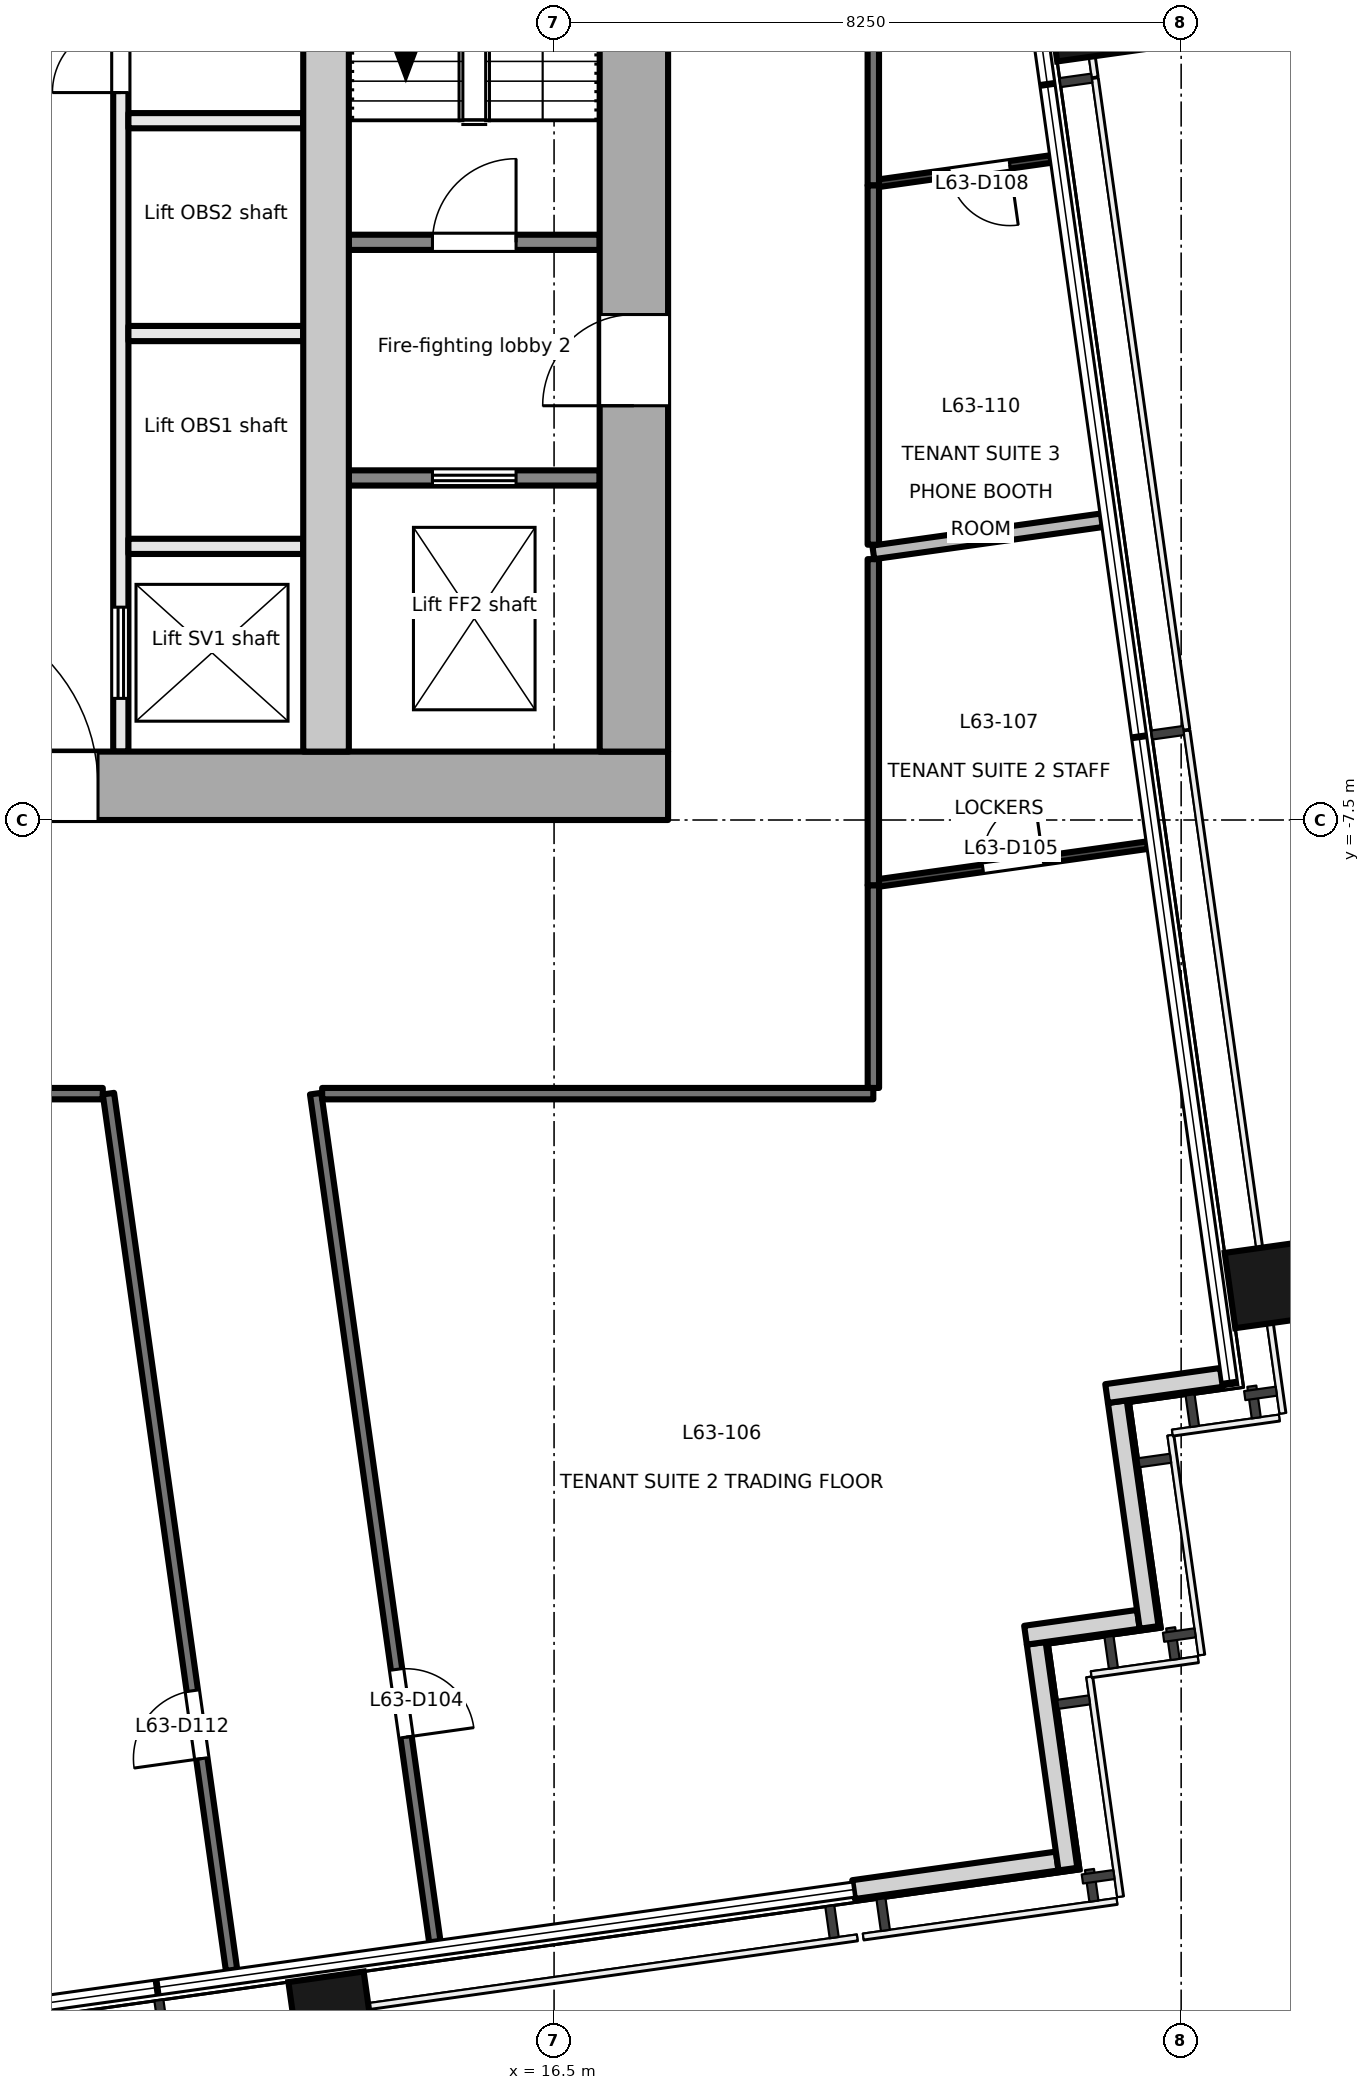
"""IFC4 building model, lengths in metres.
Left out: names, types, materials, properties, quantities, classifications, styles, units other than length and angle.
Written with IfcOpenShell. Run it as: python <this file> out.ifc"""

import sys

from ifc_helpers import new_model, si_unit, direction, frame, frame_2d, origin, origin_2d, place, context, subcontext, project, spatial, rectangle, extrude, element, fill, save


model = new_model("IFC4")
c1 = context("Model", 3, precision=1e-05, world=origin(), true_north=direction((0.0, 1.0)))
c2 = subcontext(c1, "Body", "Model", "MODEL_VIEW")
j1 = project(units=[si_unit("LENGTHUNIT", "METRE"), si_unit("PLANEANGLEUNIT", "RADIAN")], contexts=[c1])
p1 = place(None, origin())
s1 = spatial("IfcSite", under=j1, at=p1, CompositionType="ELEMENT")
p2 = place(p1, origin())
s2 = spatial("IfcBuilding", under=s1, at=p2, CompositionType="ELEMENT")
p3 = place(p2, frame((0.0, 0.0, 274.6)))
s3 = spatial("IfcBuildingStorey", under=s2, at=p3, CompositionType="ELEMENT", Elevation=274.6)
for number, where, z_axis, x_axis in (
    (1, (13.625, -23.61, -0.2), (0.0, 0.0, 1.0), (0.99, 0.139, 0.0)),
    (2, (26.284, -13.565, -0.2), (0.0, 0.0, 1.0), (-0.139, 0.99, 0.0)),
    (3, (23.941, 3.1, -0.2), (0.0, 0.0, 1.0), (-0.139, 0.99, 0.0)),
):
    element("IfcColumn", number, at=place(p3, frame(where, z_axis=z_axis, x_axis=x_axis)), inside=s3, PredefinedType="COLUMN", context=c2, shape_type="SweptSolid", body=[
        extrude(rectangle(XDim=1.0, YDim=1.8, at=origin_2d()), origin(), (0.0, 0.0, 1.0), 3.9),
    ])
p4 = place(p3, frame((20.44, -21.572, 0.0), z_axis=(0.0, 0.0, 1.0), x_axis=(0.990293105353, 0.138994839796, 0.0)))
e4 = element("IfcWall", 4, at=p4, inside=s3, PredefinedType="SOLIDWALL", context=c2, shape_type="SweptSolid", body=[
    extrude(rectangle(XDim=2.705, YDim=0.25, at=frame_2d((1.353, 0.0))), origin(), (0.0, 0.0, 1.0), 3.7),
])
p5 = place(p3, frame((23.26, -21.302, 0.0), z_axis=(0.0, 0.0, 1.0), x_axis=(-0.138994228812, 0.990293191109, 0.0)))
e5 = element("IfcWall", 5, at=p5, inside=s3, PredefinedType="SOLIDWALL", context=c2, shape_type="SweptSolid", body=[
    extrude(rectangle(XDim=3.0, YDim=0.25, at=frame_2d((1.5, 0.0))), origin(), (0.0, 0.0, 1.0), 3.7),
])
p6 = place(p3, frame((22.702, -18.225, 0.0), z_axis=(0.0, 0.0, 1.0), x_axis=(0.990243596651, 0.13934711799, 0.0)))
e6 = element("IfcWall", 6, at=p6, inside=s3, PredefinedType="SOLIDWALL", context=c2, shape_type="SweptSolid", body=[
    extrude(rectangle(XDim=1.5, YDim=0.25, at=frame_2d((0.75, 0.0))), origin(), (0.0, 0.0, 1.0), 3.7),
])
p7 = place(p3, frame((24.328, -18.122, 0.0), z_axis=(0.0, 0.0, 1.0), x_axis=(-0.139358350296, 0.990242015975, 0.0)))
e7 = element("IfcWall", 7, at=p7, inside=s3, PredefinedType="SOLIDWALL", context=c2, shape_type="SweptSolid", body=[
    extrude(rectangle(XDim=2.999, YDim=0.25, at=frame_2d((1.5, 0.0))), origin(), (0.0, 0.0, 1.0), 3.7),
])
p8 = place(p3, frame((23.769, -15.046, 0.0), z_axis=(0.0, 0.0, 1.0), x_axis=(0.990260716096, 0.139225407725, 0.0)))
e8 = element("IfcWall", 8, at=p8, inside=s3, PredefinedType="SOLIDWALL", context=c2, shape_type="SweptSolid", body=[
    extrude(rectangle(XDim=1.526, YDim=0.25, at=frame_2d((0.763, 0.0))), origin(), (0.0, 0.0, 1.0), 3.7),
])
p9 = place(p3, frame((-18.0, -7.05, -0.2), z_axis=(0.0, 0.0, 1.0), x_axis=(1.0, 0.0, 0.0)))
e9 = element("IfcWall", 9, at=p9, inside=s3, PredefinedType="SHEAR", context=c2, shape_type="SweptSolid", body=[
    extrude(rectangle(XDim=36.0, YDim=0.9, at=frame_2d((18.0, 0.0))), origin(), (0.0, 0.0, 1.0), 3.9),
])
p10 = place(p9, frame((11.3, 0.0, 0.2)))
e10 = element("IfcOpeningElement", 10, at=p10, cuts=e9, PredefinedType="OPENING", context=c2, shape_type="SweptSolid", body=[
    extrude(rectangle(XDim=1.8, YDim=2.1, at=frame_2d((0.9, 1.05))), frame((0.0, 0.46, 0.0), z_axis=(0.0, -1.0, 0.0), x_axis=(1.0, 0.0, 0.0)), (0.0, 0.0, 1.0), 0.921),
])
p11 = place(p9, frame((16.8, 0.0, 0.2)))
e11 = element("IfcOpeningElement", 11, at=p11, cuts=e9, PredefinedType="OPENING", context=c2, shape_type="SweptSolid", body=[
    extrude(rectangle(XDim=2.4, YDim=2.1, at=frame_2d((1.2, 1.05))), frame((0.0, 0.46, 0.0), z_axis=(0.0, -1.0, 0.0), x_axis=(1.0, 0.0, 0.0)), (0.0, 0.0, 1.0), 0.921),
])
p12 = place(p9, frame((26.1, 0.0, 0.2)))
e12 = element("IfcOpeningElement", 12, at=p12, cuts=e9, PredefinedType="OPENING", context=c2, shape_type="SweptSolid", body=[
    extrude(rectangle(XDim=2.4, YDim=2.1, at=frame_2d((1.2, 1.05))), frame((0.0, 0.46, 0.0), z_axis=(0.0, -1.0, 0.0), x_axis=(1.0, 0.0, 0.0)), (0.0, 0.0, 1.0), 0.921),
])
p13 = place(p3, frame((17.55, -6.6, -0.2), z_axis=(0.0, 0.0, 1.0), x_axis=(0.0, 1.0, 0.0)))
e13 = element("IfcWall", 13, at=p13, inside=s3, PredefinedType="SHEAR", context=c2, shape_type="SweptSolid", body=[
    extrude(rectangle(XDim=13.2, YDim=0.9, at=frame_2d((6.6, 0.0))), origin(), (0.0, 0.0, 1.0), 3.9),
])
p14 = place(p13, frame((4.55, 0.0, 0.2)))
e14 = element("IfcOpeningElement", 14, at=p14, cuts=e13, PredefinedType="OPENING", context=c2, shape_type="SweptSolid", body=[
    extrude(rectangle(XDim=1.2, YDim=2.1, at=frame_2d((0.6, 1.05))), frame((0.0, 0.46, 0.0), z_axis=(0.0, -1.0, 0.0), x_axis=(1.0, 0.0, 0.0)), (0.0, 0.0, 1.0), 0.921),
])
p15 = place(p3, frame((13.5, -6.6, -0.2), z_axis=(0.0, 0.0, 1.0), x_axis=(0.0, 1.0, 0.0)))
e15 = element("IfcWall", 15, at=p15, inside=s3, PredefinedType="SHEAR", context=c2, shape_type="SweptSolid", body=[
    extrude(rectangle(XDim=13.2, YDim=0.6, at=frame_2d((6.6, 0.0))), origin(), (0.0, 0.0, 1.0), 3.9),
])
p16 = place(p3, frame((13.8, -3.0, 0.0), z_axis=(0.0, 0.0, 1.0), x_axis=(1.0, 0.0, 0.0)))
e16 = element("IfcWall", 16, at=p16, inside=s3, PredefinedType="PARTITIONING", context=c2, shape_type="SweptSolid", body=[
    extrude(rectangle(XDim=3.3, YDim=0.2, at=frame_2d((1.65, 0.0))), origin(), (0.0, 0.0, 1.0), 3.7),
])
p17 = place(p16, frame((1.1, 0.0, 0.0)))
e17 = element("IfcOpeningElement", 17, at=p17, cuts=e16, PredefinedType="OPENING", context=c2, shape_type="SweptSolid", body=[
    extrude(rectangle(XDim=1.1, YDim=2.1, at=frame_2d((0.55, 1.05))), frame((0.0, 0.111, 0.0), z_axis=(0.0, -1.0, 0.0), x_axis=(1.0, 0.0, 0.0)), (0.0, 0.0, 1.0), 0.221),
])
p18 = place(p3, frame((13.8, 0.1, 0.0), z_axis=(0.0, 0.0, 1.0), x_axis=(1.0, 0.0, 0.0)))
e18 = element("IfcWall", 18, at=p18, inside=s3, PredefinedType="PARTITIONING", context=c2, shape_type="SweptSolid", body=[
    extrude(rectangle(XDim=3.3, YDim=0.2, at=frame_2d((1.65, 0.0))), origin(), (0.0, 0.0, 1.0), 3.7),
])
p19 = place(p18, frame((1.1, 0.0, 0.0)))
e19 = element("IfcOpeningElement", 19, at=p19, cuts=e18, PredefinedType="OPENING", context=c2, shape_type="SweptSolid", body=[
    extrude(rectangle(XDim=1.1, YDim=2.1, at=frame_2d((0.55, 1.05))), frame((0.0, 0.111, 0.0), z_axis=(0.0, -1.0, 0.0), x_axis=(1.0, 0.0, 0.0)), (0.0, 0.0, 1.0), 0.221),
])
p20 = place(p3, frame((10.8, -6.6, 0.0), z_axis=(0.0, 0.0, 1.0), x_axis=(0.0, 1.0, 0.0)))
e20 = element("IfcWall", 20, at=p20, inside=s3, PredefinedType="PARTITIONING", context=c2, shape_type="SweptSolid", body=[
    extrude(rectangle(XDim=13.2, YDim=0.2, at=frame_2d((6.6, 0.0))), origin(), (0.0, 0.0, 1.0), 3.7),
])
p21 = place(p20, frame((0.7, 0.0, 0.0)))
e21 = element("IfcOpeningElement", 21, at=p21, cuts=e20, PredefinedType="OPENING", context=c2, shape_type="SweptSolid", body=[
    extrude(rectangle(XDim=1.2, YDim=2.1, at=frame_2d((0.6, 1.05))), frame((0.0, 0.111, 0.0), z_axis=(0.0, -1.0, 0.0), x_axis=(1.0, 0.0, 0.0)), (0.0, 0.0, 1.0), 0.221),
])
p22 = place(p20, frame((8.67, 0.0, 0.0)))
e22 = element("IfcOpeningElement", 22, at=p22, cuts=e20, PredefinedType="OPENING", context=c2, shape_type="SweptSolid", body=[
    extrude(rectangle(XDim=0.9, YDim=2.1, at=frame_2d((0.45, 1.05))), frame((0.0, 0.111, 0.0), z_axis=(0.0, -1.0, 0.0), x_axis=(1.0, 0.0, 0.0)), (0.0, 0.0, 1.0), 0.221),
])
p23 = place(p20, frame((10.11, 0.0, 0.0)))
e23 = element("IfcOpeningElement", 23, at=p23, cuts=e20, PredefinedType="OPENING", context=c2, shape_type="SweptSolid", body=[
    extrude(rectangle(XDim=0.9, YDim=2.1, at=frame_2d((0.45, 1.05))), frame((0.0, 0.111, 0.0), z_axis=(0.0, -1.0, 0.0), x_axis=(1.0, 0.0, 0.0)), (0.0, 0.0, 1.0), 0.221),
])
p24 = place(p20, frame((11.79, 0.0, 0.0)))
e24 = element("IfcOpeningElement", 24, at=p24, cuts=e20, PredefinedType="OPENING", context=c2, shape_type="SweptSolid", body=[
    extrude(rectangle(XDim=0.9, YDim=2.1, at=frame_2d((0.45, 1.05))), frame((0.0, 0.111, 0.0), z_axis=(0.0, -1.0, 0.0), x_axis=(1.0, 0.0, 0.0)), (0.0, 0.0, 1.0), 0.221),
])
for number, where, z_axis, x_axis in (
    (25, (10.9, -3.9, 0.0), (0.0, 0.0, 1.0), (1.0, 0.0, 0.0)),
    (26, (10.9, -1.1, 0.0), (0.0, 0.0, 1.0), (1.0, 0.0, 0.0)),
    (27, (10.9, 1.7, 0.0), (0.0, 0.0, 1.0), (1.0, 0.0, 0.0)),
):
    element("IfcWall", number, at=place(p3, frame(where, z_axis=z_axis, x_axis=x_axis)), inside=s3, PredefinedType="PARTITIONING", context=c2, shape_type="SweptSolid", body=[
        extrude(rectangle(XDim=2.3, YDim=0.2, at=frame_2d((1.15, 0.0))), origin(), (0.0, 0.0, 1.0), 3.7),
    ])
p25 = place(p3, frame((13.363, -11.1, 0.0), z_axis=(0.0, 0.0, 1.0), x_axis=(0.139172815303, -0.990268108888, 0.0)))
e28 = element("IfcWall", 28, at=p25, inside=s3, PredefinedType="PARTITIONING", context=c2, shape_type="SweptSolid", body=[
    extrude(rectangle(XDim=11.266, YDim=0.15, at=frame_2d((5.633, 0.0))), origin(), (0.0, 0.0, 1.0), 3.0),
])
p26 = place(p25, frame((7.649, 0.0, 0.0)))
e29 = element("IfcOpeningElement", 29, at=p26, cuts=e28, PredefinedType="OPENING", context=c2, shape_type="SweptSolid", body=[
    extrude(rectangle(XDim=0.9, YDim=2.1, at=frame_2d((0.45, 1.05))), frame((0.0, 0.085, 0.0), z_axis=(0.0, -1.0, 0.0), x_axis=(1.0, 0.0, 0.0)), (0.0, 0.0, 1.0), 0.171),
])
p27 = place(p3, frame((20.7, -11.1, 0.0), z_axis=(0.0, 0.0, 1.0), x_axis=(-1.0, 0.0, 0.0)))
e30 = element("IfcWall", 30, at=p27, inside=s3, PredefinedType="PARTITIONING", context=c2, shape_type="SweptSolid", body=[
    extrude(rectangle(XDim=7.251, YDim=0.15, at=frame_2d((3.625, 0.0))), origin(), (0.0, 0.0, 1.0), 3.0),
])
p28 = place(p3, frame((20.701, -8.358, 0.0), z_axis=(0.0, 0.0, 1.0), x_axis=(0.0, -1.0, 0.0)))
e31 = element("IfcWall", 31, at=p28, inside=s3, PredefinedType="PARTITIONING", context=c2, shape_type="SweptSolid", body=[
    extrude(rectangle(XDim=2.667, YDim=0.15, at=frame_2d((1.333, 0.0))), origin(), (0.0, 0.0, 1.0), 3.7),
])
p29 = place(p3, frame((20.7, -4.068, 0.0), z_axis=(0.0, 0.0, 1.0), x_axis=(0.0, -1.0, 0.0)))
e32 = element("IfcWall", 32, at=p29, inside=s3, PredefinedType="PARTITIONING", context=c2, shape_type="SweptSolid", body=[
    extrude(rectangle(XDim=4.29, YDim=0.15, at=frame_2d((2.145, 0.0))), origin(), (0.0, 0.0, 1.0), 3.4),
])
p30 = place(p3, frame((20.7, 7.5, 0.0), z_axis=(0.0, 0.0, 1.0), x_axis=(0.0, -1.0, 0.0)))
e33 = element("IfcWall", 33, at=p30, inside=s3, PredefinedType="PARTITIONING", context=c2, shape_type="SweptSolid", body=[
    extrude(rectangle(XDim=6.652, YDim=0.15, at=frame_2d((3.326, 0.0))), origin(), (0.0, 0.0, 1.0), 3.4),
])
p31 = place(p3, frame((20.7, 0.848, 0.0), z_axis=(0.0, 0.0, 1.0), x_axis=(0.0, -1.0, 0.0)))
e34 = element("IfcWall", 34, at=p31, inside=s3, PredefinedType="PARTITIONING", context=c2, shape_type="SweptSolid", body=[
    extrude(rectangle(XDim=4.726, YDim=0.15, at=frame_2d((2.363, 0.0))), origin(), (0.0, 0.0, 1.0), 3.4),
])
p32 = place(p3, frame((10.563, -11.1, 0.0), z_axis=(0.0, 0.0, 1.0), x_axis=(-1.0, 0.0, 0.0)))
e35 = element("IfcWall", 35, at=p32, inside=s3, PredefinedType="PARTITIONING", context=c2, shape_type="SweptSolid", body=[
    extrude(rectangle(XDim=7.267, YDim=0.15, at=frame_2d((3.634, 0.0))), origin(), (0.0, 0.0, 1.0), 2.9),
])
p33 = place(p3, frame((12.257, -22.631, 0.0), z_axis=(0.0, 0.0, 1.0), x_axis=(-0.139134361512, 0.990273512443, 0.0)))
e36 = element("IfcWall", 36, at=p33, inside=s3, PredefinedType="PARTITIONING", context=c2, shape_type="SweptSolid", body=[
    extrude(rectangle(XDim=11.644, YDim=0.15, at=frame_2d((5.822, 0.0))), origin(), (0.0, 0.0, 1.0), 3.7),
])
p34 = place(p33, frame((2.811, 0.0, 0.0)))
e37 = element("IfcOpeningElement", 37, at=p34, cuts=e36, PredefinedType="OPENING", context=c2, shape_type="SweptSolid", body=[
    extrude(rectangle(XDim=0.9, YDim=2.1, at=frame_2d((0.45, 1.05))), frame((0.0, 0.085, 0.0), z_axis=(0.0, -1.0, 0.0), x_axis=(1.0, 0.0, 0.0)), (0.0, 0.0, 1.0), 0.171),
])
p35 = place(p3, frame((20.768, -8.328, 0.0), z_axis=(0.0, 0.0, 1.0), x_axis=(0.990282917859, 0.139067403067, 0.0)))
e38 = element("IfcWall", 38, at=p35, inside=s3, PredefinedType="PARTITIONING", context=c2, shape_type="SweptSolid", body=[
    extrude(rectangle(XDim=3.573, YDim=0.1, at=frame_2d((1.786, 0.0))), origin(), (0.0, 0.0, 1.0), 3.7),
])
p36 = place(p35, frame((1.387, 0.0, 0.0)))
e39 = element("IfcOpeningElement", 39, at=p36, cuts=e38, PredefinedType="OPENING", context=c2, shape_type="SweptSolid", body=[
    extrude(rectangle(XDim=0.8, YDim=2.1, at=frame_2d((0.4, 1.05))), frame((0.0, 0.061, 0.0), z_axis=(0.0, -1.0, 0.0), x_axis=(1.0, 0.0, 0.0)), (0.0, 0.0, 1.0), 0.121),
])
p37 = place(p3, frame((20.7, -3.979, 0.0), z_axis=(0.0, 0.0, 1.0), x_axis=(0.990284458693, 0.139056430527, 0.0)))
e40 = element("IfcWall", 40, at=p37, inside=s3, PredefinedType="PARTITIONING", context=c2, shape_type="SweptSolid", body=[
    extrude(rectangle(XDim=3.036, YDim=0.18, at=frame_2d((1.518, 0.0))), origin(), (0.0, 0.0, 1.0), 3.7),
])
p38 = place(p3, frame((23.037, 1.196, 0.0), z_axis=(0.0, 0.0, 1.0), x_axis=(-0.990256119684, -0.139258096452, 0.0)))
e41 = element("IfcWall", 41, at=p38, inside=s3, PredefinedType="PARTITIONING", context=c2, shape_type="SweptSolid", body=[
    extrude(rectangle(XDim=2.291, YDim=0.1, at=frame_2d((1.146, 0.0))), origin(), (0.0, 0.0, 1.0), 3.7),
])
p39 = place(p38, frame((0.547, 0.0, 0.0)))
e42 = element("IfcOpeningElement", 42, at=p39, cuts=e41, PredefinedType="OPENING", context=c2, shape_type="SweptSolid", body=[
    extrude(rectangle(XDim=0.8, YDim=2.1, at=frame_2d((0.4, 1.05))), frame((0.0, 0.061, 0.0), z_axis=(0.0, -1.0, 0.0), x_axis=(1.0, 0.0, 0.0)), (0.0, 0.0, 1.0), 0.121),
])
p40 = place(p17, origin())
e43 = element("IfcDoor", 43, at=p40, inside=s3, OperationType="DOUBLE_DOOR_SLIDING", PredefinedType="DOOR", context=c2, shape_type="SweptSolid", body=[
    extrude(rectangle(XDim=1.1, YDim=2.1, at=frame_2d((0.55, 1.05))), frame((0.0, 0.025, 0.0), z_axis=(0.0, -1.0, 0.0), x_axis=(1.0, 0.0, 0.0)), (0.0, 0.0, 1.0), 0.05),
])
fill(e17, e43)
p41 = place(p14, origin())
e44 = element("IfcDoor", 44, at=p41, inside=s3, OperationType="SINGLE_SWING_LEFT", PredefinedType="DOOR", context=c2, shape_type="SweptSolid", body=[
    extrude(rectangle(XDim=1.2, YDim=2.1, at=frame_2d((0.6, 1.05))), frame((0.0, 0.025, 0.0), z_axis=(0.0, -1.0, 0.0), x_axis=(1.0, 0.0, 0.0)), (0.0, 0.0, 1.0), 0.05),
])
fill(e14, e44)
p42 = place(p19, origin())
e45 = element("IfcDoor", 45, at=p42, inside=s3, OperationType="SINGLE_SWING_RIGHT", PredefinedType="DOOR", context=c2, shape_type="SweptSolid", body=[
    extrude(rectangle(XDim=1.1, YDim=2.1, at=frame_2d((0.55, 1.05))), frame((0.0, 0.025, 0.0), z_axis=(0.0, -1.0, 0.0), x_axis=(1.0, 0.0, 0.0)), (0.0, 0.0, 1.0), 0.05),
])
fill(e19, e45)
p43 = place(p12, origin())
e46 = element("IfcDoor", 46, at=p43, inside=s3, OperationType="DOUBLE_DOOR_DOUBLE_SWING", PredefinedType="DOOR", context=c2, shape_type="SweptSolid", body=[
    extrude(rectangle(XDim=2.4, YDim=2.1, at=frame_2d((1.2, 1.05))), frame((0.0, 0.025, 0.0), z_axis=(0.0, -1.0, 0.0), x_axis=(1.0, 0.0, 0.0)), (0.0, 0.0, 1.0), 0.05),
])
fill(e12, e46)
p44 = place(p21, origin())
e47 = element("IfcDoor", 47, at=p44, inside=s3, OperationType="DOUBLE_DOOR_SLIDING", PredefinedType="DOOR", context=c2, shape_type="SweptSolid", body=[
    extrude(rectangle(XDim=1.2, YDim=2.1, at=frame_2d((0.6, 1.05))), frame((0.0, 0.025, 0.0), z_axis=(0.0, -1.0, 0.0), x_axis=(1.0, 0.0, 0.0)), (0.0, 0.0, 1.0), 0.05),
])
fill(e21, e47)
p45 = place(p22, origin())
e48 = element("IfcDoor", 48, at=p45, inside=s3, OperationType="SINGLE_SWING_LEFT", PredefinedType="DOOR", context=c2, shape_type="SweptSolid", body=[
    extrude(rectangle(XDim=0.9, YDim=2.1, at=frame_2d((0.45, 1.05))), frame((0.0, 0.025, 0.0), z_axis=(0.0, -1.0, 0.0), x_axis=(1.0, 0.0, 0.0)), (0.0, 0.0, 1.0), 0.05),
])
fill(e22, e48)
p46 = place(p26, origin())
e49 = element("IfcDoor", 49, at=p46, inside=s3, OperationType="SINGLE_SWING_RIGHT", PredefinedType="DOOR", context=c2, shape_type="SweptSolid", body=[
    extrude(rectangle(XDim=0.9, YDim=2.1, at=frame_2d((0.45, 1.05))), frame((0.0, 0.025, 0.0), z_axis=(0.0, -1.0, 0.0), x_axis=(1.0, 0.0, 0.0)), (0.0, 0.0, 1.0), 0.05),
])
fill(e29, e49)
p47 = place(p36, origin())
e50 = element("IfcDoor", 50, at=p47, inside=s3, OperationType="SINGLE_SWING_RIGHT", PredefinedType="DOOR", context=c2, shape_type="SweptSolid", body=[
    extrude(rectangle(XDim=0.8, YDim=2.1, at=frame_2d((0.4, 1.05))), frame((0.0, 0.025, 0.0), z_axis=(0.0, -1.0, 0.0), x_axis=(1.0, 0.0, 0.0)), (0.0, 0.0, 1.0), 0.05),
])
fill(e39, e50)
p48 = place(p39, origin())
e51 = element("IfcDoor", 51, at=p48, inside=s3, OperationType="SINGLE_SWING_LEFT", PredefinedType="DOOR", context=c2, shape_type="SweptSolid", body=[
    extrude(rectangle(XDim=0.8, YDim=2.1, at=frame_2d((0.4, 1.05))), frame((0.0, 0.025, 0.0), z_axis=(0.0, -1.0, 0.0), x_axis=(1.0, 0.0, 0.0)), (0.0, 0.0, 1.0), 0.05),
])
fill(e42, e51)
p49 = place(p34, origin())
e52 = element("IfcDoor", 52, at=p49, inside=s3, OperationType="SINGLE_SWING_LEFT", PredefinedType="DOOR", context=c2, shape_type="SweptSolid", body=[
    extrude(rectangle(XDim=0.9, YDim=2.1, at=frame_2d((0.45, 1.05))), frame((0.0, 0.025, 0.0), z_axis=(0.0, -1.0, 0.0), x_axis=(1.0, 0.0, 0.0)), (0.0, 0.0, 1.0), 0.05),
])
fill(e37, e52)
save(model, sys.argv[1])
